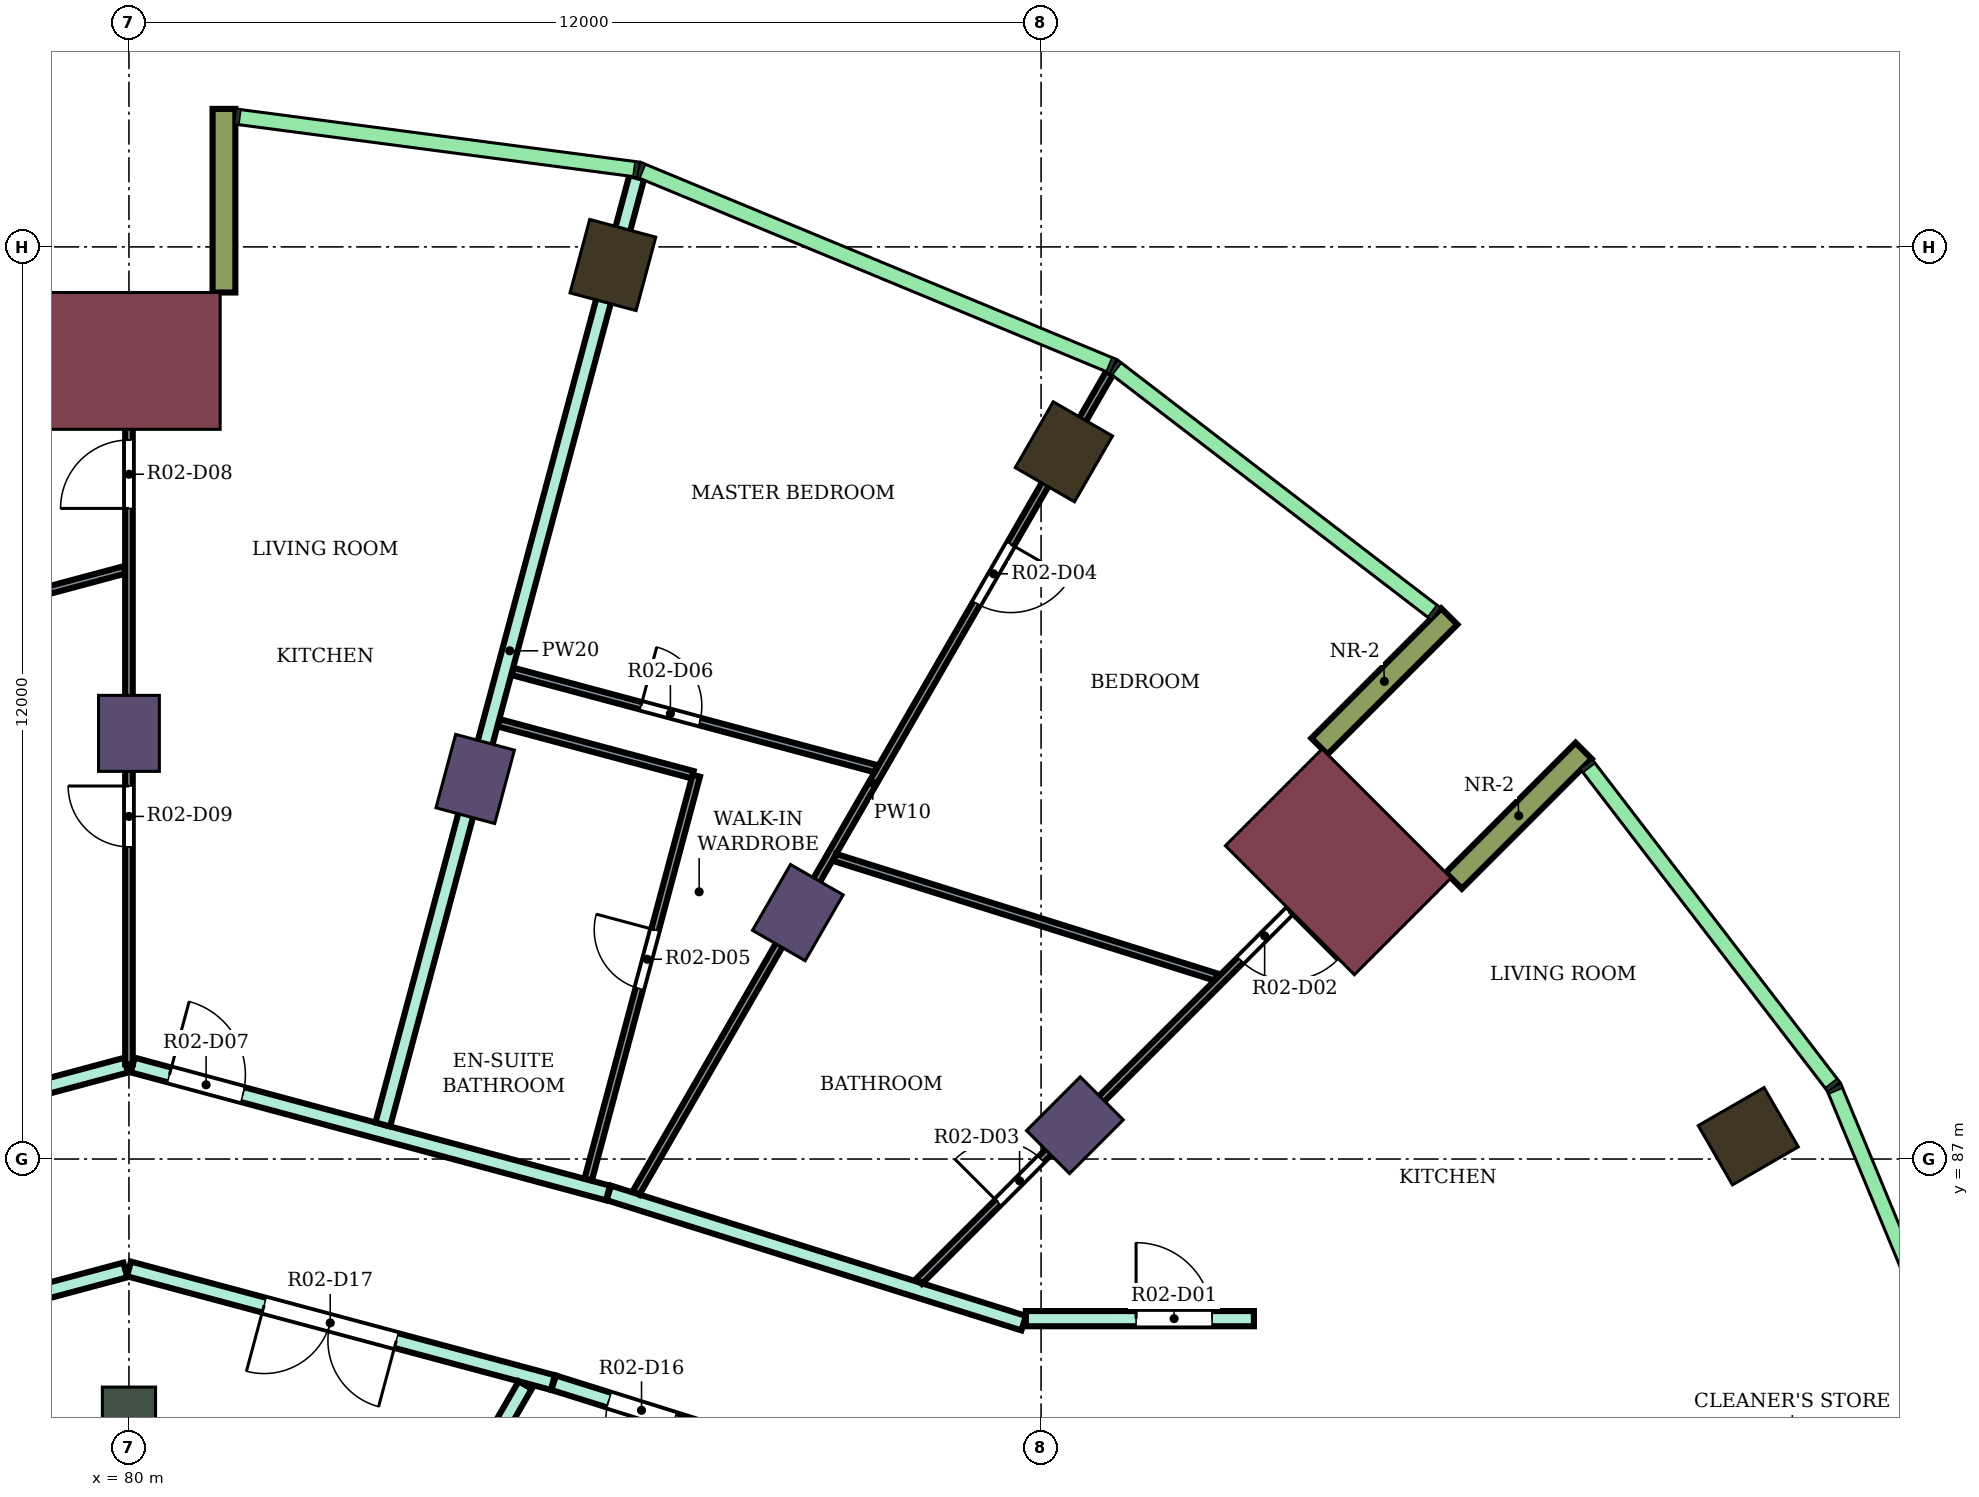
"""IFC4 building model, lengths in metres.
Left out: names, types, materials, properties, quantities, classifications, styles, units other than length and angle.
Written with IfcOpenShell. Run it as: python <this file> out.ifc"""

import sys

from ifc_helpers import new_model, si_unit, direction, frame, frame_2d, origin, origin_2d, place, context, subcontext, project, spatial, rectangle, extrude, element, fill, save


model = new_model("IFC4")
c1 = context("Model", 3, precision=1e-05, world=origin(), true_north=direction((0.0, 1.0)))
c2 = subcontext(c1, "Body", "Model", "MODEL_VIEW")
j1 = project(units=[si_unit("LENGTHUNIT", "METRE"), si_unit("PLANEANGLEUNIT", "RADIAN")], contexts=[c1])
p1 = place(None, origin())
s1 = spatial("IfcSite", under=j1, at=p1, CompositionType="ELEMENT")
p2 = place(p1, origin())
s2 = spatial("IfcBuilding", under=s1, at=p2, CompositionType="ELEMENT")
p3 = place(p2, frame((0.0, 0.0, 174.1)))
s3 = spatial("IfcBuildingStorey", under=s2, at=p3, CompositionType="ELEMENT", Elevation=174.1)
for number, where, z_axis, x_axis in (
    (1, (101.304, 87.3, 0.0), (0.0, 0.0, 1.0), (0.866, 0.5, 0.0)),
    (2, (92.3, 96.304, 0.0), (0.0, 0.0, 1.0), (0.5, 0.866, 0.0)),
    (3, (86.367, 98.762, 0.0), (0.0, 0.0, 1.0), (0.259, 0.966, 0.0)),
):
    element("IfcColumn", number, at=place(p3, frame(where, z_axis=z_axis, x_axis=x_axis)), inside=s3, PredefinedType="COLUMN", context=c2, shape_type="SweptSolid", body=[
        extrude(rectangle(XDim=1.0, YDim=0.9, at=origin_2d()), origin(), (0.0, 0.0, 1.0), 4.1),
    ])
for number, where, z_axis, x_axis in (
    (4, (92.445, 87.445, 0.0), (0.0, 0.0, 1.0), (0.707, 0.707, 0.0)),
    (5, (88.8, 90.242, 0.0), (0.0, 0.0, 1.0), (0.5, 0.866, 0.0)),
    (6, (84.555, 92.0, 0.0), (0.0, 0.0, 1.0), (0.259, 0.966, 0.0)),
    (7, (80.0, 92.6, 0.0), (0.0, 0.0, 1.0), (0.0, 1.0, 0.0)),
):
    element("IfcColumn", number, at=place(p3, frame(where, z_axis=z_axis, x_axis=x_axis)), inside=s3, PredefinedType="COLUMN", context=c2, shape_type="SweptSolid", body=[
        extrude(rectangle(XDim=1.0, YDim=0.8, at=origin_2d()), origin(), (0.0, 0.0, 1.0), 4.1),
    ])
p4 = place(p3, frame((80.0, 83.6, 0.0), z_axis=(0.0, 0.0, 1.0), x_axis=(0.0, 1.0, 0.0)))
e8 = element("IfcColumn", 8, at=p4, inside=s3, PredefinedType="COLUMN", context=c2, shape_type="SweptSolid", body=[
    extrude(rectangle(XDim=0.8, YDim=0.7, at=origin_2d()), origin(), (0.0, 0.0, 1.0), 4.1),
])
for number, where, z_axis, x_axis in (
    (9, (95.91, 90.91, 0.0), (0.0, 0.0, 1.0), (0.707, 0.707, 0.0)),
    (10, (80.0, 97.5, 0.0), (0.0, 0.0, 1.0), (0.0, 1.0, 0.0)),
):
    element("IfcColumn", number, at=place(p3, frame(where, z_axis=z_axis, x_axis=x_axis)), inside=s3, PredefinedType="COLUMN", context=c2, shape_type="SweptSolid", body=[
        extrude(rectangle(XDim=1.8, YDim=2.4, at=origin_2d()), origin(), (0.0, 0.0, 1.0), 4.1),
    ])
for number, where, z_axis, x_axis in (
    (11, (97.43, 90.662, 0.0), (0.0, 0.0, 1.0), (0.707, 0.707, 0.0)),
    (12, (95.662, 92.43, 0.0), (0.0, 0.0, 1.0), (0.707, 0.707, 0.0)),
    (13, (81.25, 98.4, 0.0), (0.0, 0.0, 1.0), (0.0, 1.0, 0.0)),
):
    element("IfcWall", number, at=place(p3, frame(where, z_axis=z_axis, x_axis=x_axis)), inside=s3, PredefinedType="NOTDEFINED", context=c2, shape_type="SweptSolid", body=[
        extrude(rectangle(XDim=2.416, YDim=0.3, at=frame_2d((1.208, 0.0))), origin(), (0.0, 0.0, 1.0), 4.1),
    ])
p5 = place(p3, frame((73.687, 86.554, 0.0), z_axis=(0.0, 0.0, 1.0), x_axis=(0.96595928904, 0.258694128106, 0.0)))
e14 = element("IfcWall", 14, at=p5, inside=s3, PredefinedType="PARTITIONING", context=c2, shape_type="SweptSolid", body=[
    extrude(rectangle(XDim=6.496, YDim=0.2, at=frame_2d((3.248, 0.0))), origin(), (0.0, 0.0, 1.0), 3.65),
])
p6 = place(p3, frame((74.413, 84.057, 0.0), z_axis=(0.0, 0.0, 1.0), x_axis=(0.965970849692, 0.258650956976, 0.0)))
e15 = element("IfcWall", 15, at=p6, inside=s3, PredefinedType="PARTITIONING", context=c2, shape_type="SweptSolid", body=[
    extrude(rectangle(XDim=5.734, YDim=0.2, at=frame_2d((2.867, 0.0))), origin(), (0.0, 0.0, 1.0), 3.65),
])
p7 = place(p3, frame((80.0, 85.554, 0.0), z_axis=(0.0, 0.0, 1.0), x_axis=(0.965894438951, -0.258936155845, 0.0)))
e16 = element("IfcWall", 16, at=p7, inside=s3, PredefinedType="PARTITIONING", context=c2, shape_type="SweptSolid", body=[
    extrude(rectangle(XDim=5.774, YDim=0.2, at=frame_2d((2.887, 0.0))), origin(), (0.0, 0.0, 1.0), 3.65),
])
p8 = place(p7, frame((1.841, 0.0, 0.0)))
e17 = element("IfcOpeningElement", 17, at=p8, cuts=e16, PredefinedType="OPENING", context=c2, shape_type="SweptSolid", body=[
    extrude(rectangle(XDim=1.8, YDim=2.1, at=frame_2d((0.9, 1.05))), frame((0.0, 0.11, 0.0), z_axis=(0.0, -1.0, 0.0), x_axis=(1.0, 0.0, 0.0)), (0.0, 0.0, 1.0), 0.22),
])
p9 = place(p3, frame((80.049, 88.237, 0.0), z_axis=(0.0, 0.0, 1.0), x_axis=(0.965582990495, -0.260095152718, 0.0)))
e18 = element("IfcWall", 18, at=p9, inside=s3, PredefinedType="PARTITIONING", context=c2, shape_type="SweptSolid", body=[
    extrude(rectangle(XDim=6.476, YDim=0.2, at=frame_2d((3.238, 0.0))), origin(), (0.0, 0.0, 1.0), 3.65),
])
p10 = place(p9, frame((0.5, 0.0, 0.0)))
e19 = element("IfcOpeningElement", 19, at=p10, cuts=e18, PredefinedType="OPENING", context=c2, shape_type="SweptSolid", body=[
    extrude(rectangle(XDim=1.0, YDim=2.1, at=frame_2d((0.5, 1.05))), frame((0.0, 0.11, 0.0), z_axis=(0.0, -1.0, 0.0), x_axis=(1.0, 0.0, 0.0)), (0.0, 0.0, 1.0), 0.22),
])
p11 = place(p3, frame((83.339, 87.455, 0.0), z_axis=(0.0, 0.0, 1.0), x_axis=(0.258941302036, 0.96589305935, 0.0)))
e20 = element("IfcWall", 20, at=p11, inside=s3, PredefinedType="PARTITIONING", context=c2, shape_type="SweptSolid", body=[
    extrude(rectangle(XDim=12.904, YDim=0.2, at=frame_2d((6.452, 0.0))), origin(), (0.0, 0.0, 1.0), 3.65),
])
p12 = place(p3, frame((83.851, 81.667, 0.0), z_axis=(0.0, 0.0, 1.0), x_axis=(0.500099931433, 0.865967700657, 0.0)))
e21 = element("IfcWall", 21, at=p12, inside=s3, PredefinedType="PARTITIONING", context=c2, shape_type="SweptSolid", body=[
    extrude(rectangle(XDim=2.725, YDim=0.2, at=frame_2d((1.362, 0.0))), origin(), (0.0, 0.0, 1.0), 3.65),
])
p13 = place(p3, frame((85.587, 84.057, 0.0), z_axis=(0.0, 0.0, 1.0), x_axis=(0.954239513179, -0.299043393987, 0.0)))
e22 = element("IfcWall", 22, at=p13, inside=s3, PredefinedType="PARTITIONING", context=c2, shape_type="SweptSolid", body=[
    extrude(rectangle(XDim=2.424, YDim=0.2, at=frame_2d((1.212, 0.0))), origin(), (0.0, 0.0, 1.0), 3.65),
])
p14 = place(p13, frame((0.762, 0.0, 0.0)))
e23 = element("IfcOpeningElement", 23, at=p14, cuts=e22, PredefinedType="OPENING", context=c2, shape_type="SweptSolid", body=[
    extrude(rectangle(XDim=0.9, YDim=2.1, at=frame_2d((0.45, 1.05))), frame((0.0, 0.11, 0.0), z_axis=(0.0, -1.0, 0.0), x_axis=(1.0, 0.0, 0.0)), (0.0, 0.0, 1.0), 0.22),
])
p15 = place(p3, frame((86.313, 86.554, 0.0), z_axis=(0.0, 0.0, 1.0), x_axis=(0.954081217458, -0.299548043717, 0.0)))
e24 = element("IfcWall", 24, at=p15, inside=s3, PredefinedType="PARTITIONING", context=c2, shape_type="SweptSolid", body=[
    extrude(rectangle(XDim=5.721, YDim=0.2, at=frame_2d((2.86, 0.0))), origin(), (0.0, 0.0, 1.0), 3.65),
])
p16 = place(p3, frame((91.8, 84.9, 0.0), z_axis=(0.0, 0.0, 1.0), x_axis=(1.0, 0.0, 0.0)))
e25 = element("IfcWall", 25, at=p16, inside=s3, PredefinedType="PARTITIONING", context=c2, shape_type="SweptSolid", body=[
    extrude(rectangle(XDim=3.0, YDim=0.2, at=frame_2d((1.5, 0.0))), origin(), (0.0, 0.0, 1.0), 3.65),
])
p17 = place(p16, frame((1.45, 0.0, 0.0)))
e26 = element("IfcOpeningElement", 26, at=p17, cuts=e25, PredefinedType="OPENING", context=c2, shape_type="SweptSolid", body=[
    extrude(rectangle(XDim=1.0, YDim=2.1, at=frame_2d((0.5, 1.05))), frame((0.0, 0.11, 0.0), z_axis=(0.0, -1.0, 0.0), x_axis=(1.0, 0.0, 0.0)), (0.0, 0.0, 1.0), 0.22),
])
p18 = place(p3, frame((70.232, 92.151, 0.0), z_axis=(0.0, 0.0, 1.0), x_axis=(0.965980126086, 0.258616310405, 0.0)))
e27 = element("IfcWall", 27, at=p18, inside=s3, PredefinedType="PARTITIONING", context=c2, shape_type="SweptSolid", body=[
    extrude(rectangle(XDim=10.053, YDim=0.1, at=frame_2d((5.026, 0.0))), origin(), (0.0, 0.0, 1.0), 3.65),
])
p19 = place(p18, frame((2.038, 0.0, 0.0)))
e28 = element("IfcOpeningElement", 28, at=p19, cuts=e27, PredefinedType="OPENING", context=c2, shape_type="SweptSolid", body=[
    extrude(rectangle(XDim=0.8, YDim=2.1, at=frame_2d((0.4, 1.05))), frame((0.0, 0.06, 0.0), z_axis=(0.0, -1.0, 0.0), x_axis=(1.0, 0.0, 0.0)), (0.0, 0.0, 1.0), 0.12),
])
p20 = place(p3, frame((80.0, 88.246, 0.0), z_axis=(0.0, 0.0, 1.0), x_axis=(0.0, 1.0, 0.0)))
e29 = element("IfcWall", 29, at=p20, inside=s3, PredefinedType="PARTITIONING", context=c2, shape_type="SweptSolid", body=[
    extrude(rectangle(XDim=9.954, YDim=0.1, at=frame_2d((4.977, 0.0))), origin(), (0.0, 0.0, 1.0), 3.65),
])
p21 = place(p20, frame((7.313, 0.0, 0.0)))
e30 = element("IfcOpeningElement", 30, at=p21, cuts=e29, PredefinedType="OPENING", context=c2, shape_type="SweptSolid", body=[
    extrude(rectangle(XDim=0.9, YDim=2.1, at=frame_2d((0.45, 1.05))), frame((0.0, 0.06, 0.0), z_axis=(0.0, -1.0, 0.0), x_axis=(1.0, 0.0, 0.0)), (0.0, 0.0, 1.0), 0.12),
])
p22 = place(p20, frame((2.862, 0.0, 0.0)))
e31 = element("IfcOpeningElement", 31, at=p22, cuts=e29, PredefinedType="OPENING", context=c2, shape_type="SweptSolid", body=[
    extrude(rectangle(XDim=0.8, YDim=2.1, at=frame_2d((0.4, 1.05))), frame((0.0, 0.06, 0.0), z_axis=(0.0, -1.0, 0.0), x_axis=(1.0, 0.0, 0.0)), (0.0, 0.0, 1.0), 0.12),
])
p23 = place(p3, frame((84.867, 92.739, 0.0), z_axis=(0.0, 0.0, 1.0), x_axis=(0.96595176814, -0.25872220938, 0.0)))
e32 = element("IfcWall", 32, at=p23, inside=s3, PredefinedType="PARTITIONING", context=c2, shape_type="SweptSolid", body=[
    extrude(rectangle(XDim=2.638, YDim=0.1, at=frame_2d((1.319, 0.0))), origin(), (0.0, 0.0, 1.0), 3.65),
])
p24 = place(p3, frame((85.048, 93.415, 0.0), z_axis=(0.0, 0.0, 1.0), x_axis=(0.965981309458, -0.258611890247, 0.0)))
e33 = element("IfcWall", 33, at=p24, inside=s3, PredefinedType="PARTITIONING", context=c2, shape_type="SweptSolid", body=[
    extrude(rectangle(XDim=4.946, YDim=0.1, at=frame_2d((2.473, 0.0))), origin(), (0.0, 0.0, 1.0), 3.65),
])
p25 = place(p24, frame((1.748, 0.0, 0.0)))
e34 = element("IfcOpeningElement", 34, at=p25, cuts=e33, PredefinedType="OPENING", context=c2, shape_type="SweptSolid", body=[
    extrude(rectangle(XDim=0.8, YDim=2.1, at=frame_2d((0.4, 1.05))), frame((0.0, 0.06, 0.0), z_axis=(0.0, -1.0, 0.0), x_axis=(1.0, 0.0, 0.0)), (0.0, 0.0, 1.0), 0.12),
])
p26 = place(p3, frame((86.042, 86.731, 0.0), z_axis=(0.0, 0.0, 1.0), x_axis=(0.258599239637, 0.965984696183, 0.0)))
e35 = element("IfcWall", 35, at=p26, inside=s3, PredefinedType="PARTITIONING", context=c2, shape_type="SweptSolid", body=[
    extrude(rectangle(XDim=5.499, YDim=0.1, at=frame_2d((2.75, 0.0))), origin(), (0.0, 0.0, 1.0), 3.65),
])
p27 = place(p26, frame((2.6, 0.0, 0.0)))
e36 = element("IfcOpeningElement", 36, at=p27, cuts=e35, PredefinedType="OPENING", context=c2, shape_type="SweptSolid", body=[
    extrude(rectangle(XDim=0.8, YDim=2.1, at=frame_2d((0.4, 1.05))), frame((0.0, 0.06, 0.0), z_axis=(0.0, -1.0, 0.0), x_axis=(1.0, 0.0, 0.0)), (0.0, 0.0, 1.0), 0.12),
])
p28 = place(p3, frame((86.672, 86.554, 0.0), z_axis=(0.0, 0.0, 1.0), x_axis=(0.500043115992, 0.866000509324, 0.0)))
e37 = element("IfcWall", 37, at=p28, inside=s3, PredefinedType="PARTITIONING", context=c2, shape_type="SweptSolid", body=[
    extrude(rectangle(XDim=12.456, YDim=0.1, at=frame_2d((6.228, 0.0))), origin(), (0.0, 0.0, 1.0), 3.65),
])
p29 = place(p28, frame((8.956, 0.0, 0.0)))
e38 = element("IfcOpeningElement", 38, at=p29, cuts=e37, PredefinedType="OPENING", context=c2, shape_type="SweptSolid", body=[
    extrude(rectangle(XDim=0.9, YDim=2.1, at=frame_2d((0.45, 1.05))), frame((0.0, 0.06, 0.0), z_axis=(0.0, -1.0, 0.0), x_axis=(1.0, 0.0, 0.0)), (0.0, 0.0, 1.0), 0.12),
])
p30 = place(p3, frame((89.286, 90.967, 0.0), z_axis=(0.0, 0.0, 1.0), x_axis=(0.954193783918, -0.299189275763, 0.0)))
e39 = element("IfcWall", 39, at=p30, inside=s3, PredefinedType="PARTITIONING", context=c2, shape_type="SweptSolid", body=[
    extrude(rectangle(XDim=5.26, YDim=0.1, at=frame_2d((2.63, 0.0))), origin(), (0.0, 0.0, 1.0), 3.65),
])
p31 = place(p3, frame((90.396, 85.393, 0.0), z_axis=(0.0, 0.0, 1.0), x_axis=(0.707279106146, 0.706934414221, 0.0)))
e40 = element("IfcWall", 40, at=p31, inside=s3, PredefinedType="PARTITIONING", context=c2, shape_type="SweptSolid", body=[
    extrude(rectangle(XDim=8.5, YDim=0.1, at=frame_2d((4.25, 0.0))), origin(), (0.0, 0.0, 1.0), 3.65),
])
p32 = place(p31, frame((5.976, 0.0, 0.0)))
e41 = element("IfcOpeningElement", 41, at=p32, cuts=e40, PredefinedType="OPENING", context=c2, shape_type="SweptSolid", body=[
    extrude(rectangle(XDim=0.9, YDim=2.1, at=frame_2d((0.45, 1.05))), frame((0.0, 0.06, 0.0), z_axis=(0.0, -1.0, 0.0), x_axis=(1.0, 0.0, 0.0)), (0.0, 0.0, 1.0), 0.12),
])
p33 = place(p31, frame((1.467, 0.0, 0.0)))
e42 = element("IfcOpeningElement", 42, at=p33, cuts=e40, PredefinedType="OPENING", context=c2, shape_type="SweptSolid", body=[
    extrude(rectangle(XDim=0.8, YDim=2.1, at=frame_2d((0.4, 1.05))), frame((0.0, 0.06, 0.0), z_axis=(0.0, -1.0, 0.0), x_axis=(1.0, 0.0, 0.0)), (0.0, 0.0, 1.0), 0.12),
])
p34 = place(p17, origin())
e43 = element("IfcDoor", 43, at=p34, inside=s3, OperationType="SINGLE_SWING_LEFT", PredefinedType="DOOR", context=c2, shape_type="SweptSolid", body=[
    extrude(rectangle(XDim=1.0, YDim=2.1, at=frame_2d((0.5, 1.05))), frame((0.0, 0.025, 0.0), z_axis=(0.0, -1.0, 0.0), x_axis=(1.0, 0.0, 0.0)), (0.0, 0.0, 1.0), 0.05),
])
fill(e26, e43)
p35 = place(p32, frame((0.9, 0.0, 0.0), z_axis=(0.0, 0.0, 1.0), x_axis=(-1.0, 0.0, 0.0)))
e44 = element("IfcDoor", 44, at=p35, inside=s3, OperationType="SINGLE_SWING_LEFT", PredefinedType="DOOR", context=c2, shape_type="SweptSolid", body=[
    extrude(rectangle(XDim=0.9, YDim=2.1, at=frame_2d((0.45, 1.05))), frame((0.0, 0.025, 0.0), z_axis=(0.0, -1.0, 0.0), x_axis=(1.0, 0.0, 0.0)), (0.0, 0.0, 1.0), 0.05),
])
fill(e41, e44)
p36 = place(p33, origin())
e45 = element("IfcDoor", 45, at=p36, inside=s3, OperationType="SINGLE_SWING_LEFT", PredefinedType="DOOR", context=c2, shape_type="SweptSolid", body=[
    extrude(rectangle(XDim=0.8, YDim=2.1, at=frame_2d((0.4, 1.05))), frame((0.0, 0.025, 0.0), z_axis=(0.0, -1.0, 0.0), x_axis=(1.0, 0.0, 0.0)), (0.0, 0.0, 1.0), 0.05),
])
fill(e42, e45)
p37 = place(p29, frame((0.9, 0.0, 0.0), z_axis=(0.0, 0.0, 1.0), x_axis=(-1.0, 0.0, 0.0)))
e46 = element("IfcDoor", 46, at=p37, inside=s3, OperationType="SINGLE_SWING_LEFT", PredefinedType="DOOR", context=c2, shape_type="SweptSolid", body=[
    extrude(rectangle(XDim=0.9, YDim=2.1, at=frame_2d((0.45, 1.05))), frame((0.0, 0.025, 0.0), z_axis=(0.0, -1.0, 0.0), x_axis=(1.0, 0.0, 0.0)), (0.0, 0.0, 1.0), 0.05),
])
fill(e38, e46)
p38 = place(p27, origin())
e47 = element("IfcDoor", 47, at=p38, inside=s3, OperationType="SINGLE_SWING_RIGHT", PredefinedType="DOOR", context=c2, shape_type="SweptSolid", body=[
    extrude(rectangle(XDim=0.8, YDim=2.1, at=frame_2d((0.4, 1.05))), frame((0.0, 0.025, 0.0), z_axis=(0.0, -1.0, 0.0), x_axis=(1.0, 0.0, 0.0)), (0.0, 0.0, 1.0), 0.05),
])
fill(e36, e47)
p39 = place(p25, origin())
e48 = element("IfcDoor", 48, at=p39, inside=s3, OperationType="SINGLE_SWING_LEFT", PredefinedType="DOOR", context=c2, shape_type="SweptSolid", body=[
    extrude(rectangle(XDim=0.8, YDim=2.1, at=frame_2d((0.4, 1.05))), frame((0.0, 0.025, 0.0), z_axis=(0.0, -1.0, 0.0), x_axis=(1.0, 0.0, 0.0)), (0.0, 0.0, 1.0), 0.05),
])
fill(e34, e48)
p40 = place(p10, origin())
e49 = element("IfcDoor", 49, at=p40, inside=s3, OperationType="SINGLE_SWING_LEFT", PredefinedType="DOOR", context=c2, shape_type="SweptSolid", body=[
    extrude(rectangle(XDim=1.0, YDim=2.1, at=frame_2d((0.5, 1.05))), frame((0.0, 0.025, 0.0), z_axis=(0.0, -1.0, 0.0), x_axis=(1.0, 0.0, 0.0)), (0.0, 0.0, 1.0), 0.05),
])
fill(e19, e49)
p41 = place(p21, origin())
e50 = element("IfcDoor", 50, at=p41, inside=s3, OperationType="SINGLE_SWING_LEFT", PredefinedType="DOOR", context=c2, shape_type="SweptSolid", body=[
    extrude(rectangle(XDim=0.9, YDim=2.1, at=frame_2d((0.45, 1.05))), frame((0.0, 0.025, 0.0), z_axis=(0.0, -1.0, 0.0), x_axis=(1.0, 0.0, 0.0)), (0.0, 0.0, 1.0), 0.05),
])
fill(e30, e50)
p42 = place(p22, origin())
e51 = element("IfcDoor", 51, at=p42, inside=s3, OperationType="SINGLE_SWING_RIGHT", PredefinedType="DOOR", context=c2, shape_type="SweptSolid", body=[
    extrude(rectangle(XDim=0.8, YDim=2.1, at=frame_2d((0.4, 1.05))), frame((0.0, 0.025, 0.0), z_axis=(0.0, -1.0, 0.0), x_axis=(1.0, 0.0, 0.0)), (0.0, 0.0, 1.0), 0.05),
])
fill(e31, e51)
p43 = place(p14, frame((0.9, 0.0, 0.0), z_axis=(0.0, 0.0, 1.0), x_axis=(-1.0, 0.0, 0.0)))
e52 = element("IfcDoor", 52, at=p43, inside=s3, OperationType="SINGLE_SWING_LEFT", PredefinedType="DOOR", context=c2, shape_type="SweptSolid", body=[
    extrude(rectangle(XDim=0.9, YDim=2.1, at=frame_2d((0.45, 1.05))), frame((0.0, 0.025, 0.0), z_axis=(0.0, -1.0, 0.0), x_axis=(1.0, 0.0, 0.0)), (0.0, 0.0, 1.0), 0.05),
])
fill(e23, e52)
p44 = place(p8, frame((1.8, 0.0, 0.0), z_axis=(0.0, 0.0, 1.0), x_axis=(-1.0, 0.0, 0.0)))
e53 = element("IfcDoor", 53, at=p44, inside=s3, OperationType="DOUBLE_DOOR_SINGLE_SWING", PredefinedType="DOOR", context=c2, shape_type="SweptSolid", body=[
    extrude(rectangle(XDim=1.8, YDim=2.1, at=frame_2d((0.9, 1.05))), frame((0.0, 0.025, 0.0), z_axis=(0.0, -1.0, 0.0), x_axis=(1.0, 0.0, 0.0)), (0.0, 0.0, 1.0), 0.05),
])
fill(e17, e53)
save(model, sys.argv[1])
